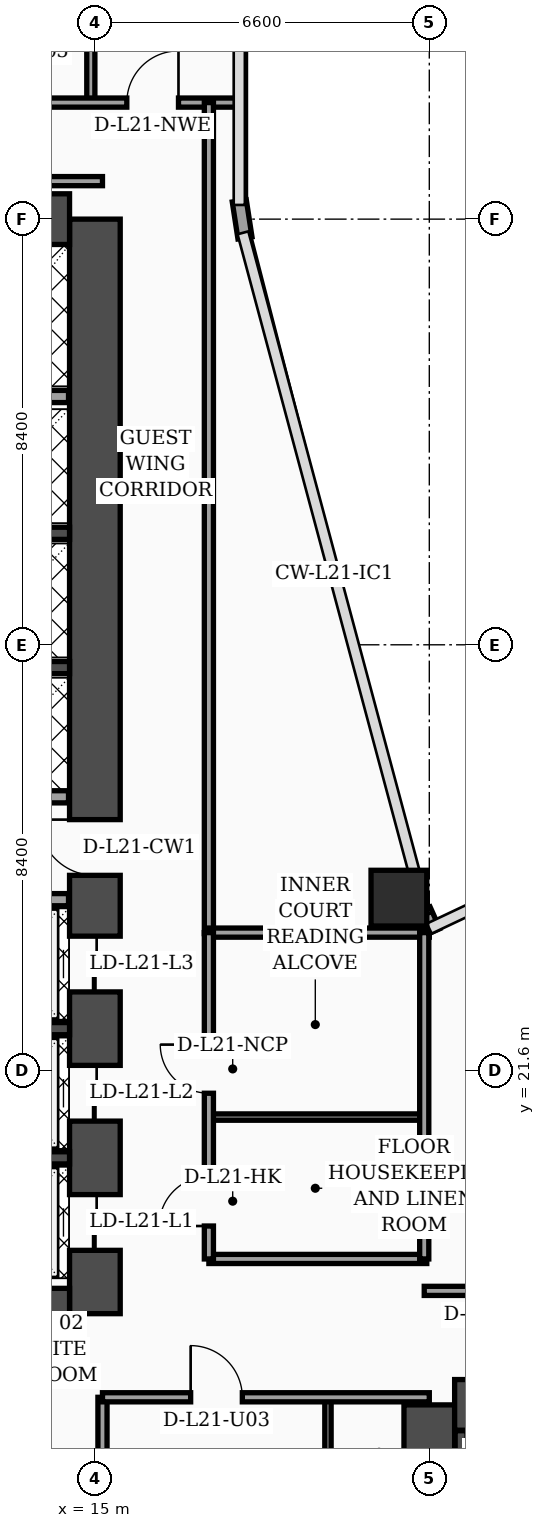
"""IFC4 building model, lengths in metres.
Left out: names, types, materials, properties, quantities, classifications, styles, units other than length and angle.
Written with IfcOpenShell. Run it as: python <this file> out.ifc"""

import sys

from ifc_helpers import new_model, si_unit, direction, frame, frame_2d, origin, origin_2d, place, context, subcontext, project, spatial, rectangle, hollow_rectangle, extrude, element, fill, save


model = new_model("IFC4")
c1 = context("Model", 3, precision=1e-05, world=origin(), true_north=direction((0.0, 1.0)))
c2 = subcontext(c1, "Body", "Model", "MODEL_VIEW")
j1 = project(units=[si_unit("LENGTHUNIT", "METRE"), si_unit("PLANEANGLEUNIT", "RADIAN")], contexts=[c1])
p1 = place(None, origin())
s1 = spatial("IfcSite", under=j1, at=p1, CompositionType="ELEMENT")
p2 = place(p1, origin())
s2 = spatial("IfcBuilding", under=s1, at=p2, CompositionType="ELEMENT")
p3 = place(p2, frame((0.0, 0.0, 88.8)))
s3 = spatial("IfcBuildingStorey", under=s2, at=p3, CompositionType="ELEMENT", Elevation=88.8)
p4 = place(p3, frame((15.0, 16.8, 0.0), z_axis=(0.0, 0.0, 1.0), x_axis=(0.0, 1.0, 0.0)))
e1 = element("IfcWall", 1, at=p4, inside=s3, PredefinedType="SHEAR", context=c2, shape_type="SweptSolid", body=[
    extrude(rectangle(XDim=21.6, YDim=1.0, at=frame_2d((10.8, 0.0))), origin(), (0.0, 0.0, 1.0), 3.52),
])
p5 = place(p4, frame((8.65, 0.0, 0.0)))
e2 = element("IfcOpeningElement", 2, at=p5, cuts=e1, PredefinedType="OPENING", context=c2, shape_type="SweptSolid", body=[
    extrude(rectangle(XDim=1.1, YDim=2.2, at=frame_2d((0.55, 1.1))), frame((0.0, 0.51, 0.0), z_axis=(0.0, -1.0, 0.0), x_axis=(1.0, 0.0, 0.0)), (0.0, 0.0, 1.0), 1.02),
])
p6 = place(p4, frame((1.25, 0.0, 0.0)))
e3 = element("IfcOpeningElement", 3, at=p6, cuts=e1, PredefinedType="OPENING", context=c2, shape_type="SweptSolid", body=[
    extrude(rectangle(XDim=1.1, YDim=2.2, at=frame_2d((0.55, 1.1))), frame((0.0, 0.51, 0.0), z_axis=(0.0, -1.0, 0.0), x_axis=(1.0, 0.0, 0.0)), (0.0, 0.0, 1.0), 1.02),
])
p7 = place(p4, frame((3.8, 0.0, 0.0)))
e4 = element("IfcOpeningElement", 4, at=p7, cuts=e1, PredefinedType="OPENING", context=c2, shape_type="SweptSolid", body=[
    extrude(rectangle(XDim=1.1, YDim=2.2, at=frame_2d((0.55, 1.1))), frame((0.0, 0.51, 0.0), z_axis=(0.0, -1.0, 0.0), x_axis=(1.0, 0.0, 0.0)), (0.0, 0.0, 1.0), 1.02),
])
p8 = place(p4, frame((6.35, 0.0, 0.0)))
e5 = element("IfcOpeningElement", 5, at=p8, cuts=e1, PredefinedType="OPENING", context=c2, shape_type="SweptSolid", body=[
    extrude(rectangle(XDim=1.1, YDim=2.2, at=frame_2d((0.55, 1.1))), frame((0.0, 0.51, 0.0), z_axis=(0.0, -1.0, 0.0), x_axis=(1.0, 0.0, 0.0)), (0.0, 0.0, 1.0), 1.02),
])
for number, where, z_axis, x_axis in (
    (6, (4.7, 38.4, 0.0), (0.0, 0.0, 1.0), (1.0, 0.0, 0.0)),
    (7, (4.7, 16.8, 0.0), (0.0, 0.0, 1.0), (1.0, 0.0, 0.0)),
):
    element("IfcWall", number, at=place(p3, frame(where, z_axis=z_axis, x_axis=x_axis)), inside=s3, PredefinedType="SHEAR", context=c2, shape_type="SweptSolid", body=[
        extrude(rectangle(XDim=9.8, YDim=1.0, at=frame_2d((4.9, 0.0))), origin(), (0.0, 0.0, 1.0), 3.52),
    ])
p9 = place(p3, frame((21.6, 4.6, 0.0), z_axis=(0.0, 0.0, 1.0), x_axis=(0.0, 1.0, 0.0)))
e8 = element("IfcWall", 8, at=p9, inside=s3, PredefinedType="SHEAR", context=c2, shape_type="SweptSolid", body=[
    extrude(rectangle(XDim=10.4, YDim=1.0, at=frame_2d((5.2, 0.0))), origin(), (0.0, 0.0, 1.0), 3.52),
])
p10 = place(p3, frame((22.1, 15.0, 0.0), z_axis=(0.0, 0.0, 1.0), x_axis=(1.0, 0.0, 0.0)))
e9 = element("IfcWall", 9, at=p10, inside=s3, PredefinedType="SHEAR", context=c2, shape_type="SweptSolid", body=[
    extrude(rectangle(XDim=9.8, YDim=1.0, at=frame_2d((4.9, 0.0))), origin(), (0.0, 0.0, 1.0), 3.52),
])
p11 = place(p10, frame((4.8, 0.0, 0.0)))
e10 = element("IfcOpeningElement", 10, at=p11, cuts=e9, PredefinedType="OPENING", context=c2, shape_type="SweptSolid", body=[
    extrude(rectangle(XDim=1.1, YDim=2.2, at=frame_2d((0.55, 1.1))), frame((0.0, 0.51, 0.0), z_axis=(0.0, -1.0, 0.0), x_axis=(1.0, 0.0, 0.0)), (0.0, 0.0, 1.0), 1.02),
])
p12 = place(p3, frame((22.23, 5.1, 0.0), z_axis=(0.0, 0.0, 1.0), x_axis=(0.0, 1.0, 0.0)))
e11 = element("IfcWall", 11, at=p12, inside=s3, PredefinedType="SOLIDWALL", context=c2, shape_type="SweptSolid", body=[
    extrude(rectangle(XDim=9.39, YDim=0.24, at=frame_2d((4.695, 0.0))), origin(), (0.0, 0.0, 1.0), 3.52),
])
for number, where, z_axis, x_axis in (
    (12, (12.18, 19.875, 0.0), (0.0, 0.0, 1.0), (1.0, 0.0, 0.0)),
    (13, (12.18, 22.425, 0.0), (0.0, 0.0, 1.0), (1.0, 0.0, 0.0)),
    (14, (12.18, 29.55, 0.0), (0.0, 0.0, 1.0), (1.0, 0.0, 0.0)),
    (15, (12.18, 32.2, 0.0), (0.0, 0.0, 1.0), (1.0, 0.0, 0.0)),
):
    element("IfcWall", number, at=place(p3, frame(where, z_axis=z_axis, x_axis=x_axis)), inside=s3, PredefinedType="SOLIDWALL", context=c2, shape_type="SweptSolid", body=[
        extrude(rectangle(XDim=2.32, YDim=0.24, at=frame_2d((1.16, 0.0))), origin(), (0.0, 0.0, 1.0), 3.52),
    ])
p13 = place(p3, frame((21.0, 25.0, 0.0), z_axis=(0.0, 0.0, 1.0), x_axis=(1.0, 0.0, 0.0)))
e16 = element("IfcColumn", 16, at=p13, inside=s3, PredefinedType="COLUMN", context=c2, shape_type="SweptSolid", body=[
    extrude(hollow_rectangle(XDim=1.1, YDim=1.1, WallThickness=0.045, at=origin_2d()), origin(), (0.0, 0.0, 1.0), 3.52),
])
p14 = place(p3, frame((21.68, 24.34, 0.0), z_axis=(0.0, 0.0, 1.0), x_axis=(-0.40758134973, 0.913168901875, 0.0)))
e17 = element("IfcWall", 17, at=p14, inside=s3, PredefinedType="SOLIDWALL", context=c2, shape_type="SweptSolid", body=[
    extrude(rectangle(XDim=0.471, YDim=0.28, at=frame_2d((0.235, 0.0))), origin(), (0.0, 0.0, 1.0), 3.52),
])
p15 = place(p3, frame((17.962, 38.03, 0.0), z_axis=(0.0, 0.0, 1.0), x_axis=(-0.15141125477, 0.988470855377, 0.0)))
e18 = element("IfcWall", 18, at=p15, inside=s3, PredefinedType="SOLIDWALL", context=c2, shape_type="SweptSolid", body=[
    extrude(rectangle(XDim=0.739, YDim=0.28, at=frame_2d((0.369, 0.0))), origin(), (0.0, 0.0, 1.0), 3.52),
])
p16 = place(p3, frame((12.15, 24.97, 0.0), z_axis=(0.0, 0.0, 1.0), x_axis=(1.0, 0.0, 0.0)))
e19 = element("IfcWall", 19, at=p16, inside=s3, PredefinedType="SOLIDWALL", context=c2, shape_type="SweptSolid", body=[
    extrude(rectangle(XDim=2.33, YDim=0.24, at=frame_2d((1.165, 0.0))), origin(), (0.0, 0.0, 1.0), 2.82),
])
p17 = place(p3, frame((12.25, 27.0, 0.0), z_axis=(0.0, 0.0, 1.0), x_axis=(1.0, 0.0, 0.0)))
e20 = element("IfcWall", 20, at=p17, inside=s3, PredefinedType="SOLIDWALL", context=c2, shape_type="SweptSolid", body=[
    extrude(rectangle(XDim=2.23, YDim=0.24, at=frame_2d((1.115, 0.0))), origin(), (0.0, 0.0, 1.0), 3.52),
])
p18 = place(p3, frame((9.66, 34.9, 0.0), z_axis=(0.0, 0.0, 1.0), x_axis=(1.0, 0.0, 0.0)))
e21 = element("IfcWall", 21, at=p18, inside=s3, PredefinedType="SOLIDWALL", context=c2, shape_type="SweptSolid", body=[
    extrude(rectangle(XDim=4.82, YDim=0.24, at=frame_2d((2.41, 0.0))), origin(), (0.0, 0.0, 1.0), 3.52),
])
p19 = place(p3, frame((15.15, 2.44, 0.0), z_axis=(0.0, 0.0, 1.0), x_axis=(0.0, 1.0, 0.0)))
e22 = element("IfcWall", 22, at=p19, inside=s3, PredefinedType="PARTITIONING", context=c2, shape_type="SweptSolid", body=[
    extrude(rectangle(XDim=12.71, YDim=0.18, at=frame_2d((6.355, 0.0))), origin(), (0.0, 0.0, 1.0), 3.02),
])
p20 = place(p3, frame((19.6, 2.44, 0.0), z_axis=(0.0, 0.0, 1.0), x_axis=(0.0, 1.0, 0.0)))
e23 = element("IfcWall", 23, at=p20, inside=s3, PredefinedType="PARTITIONING", context=c2, shape_type="SweptSolid", body=[
    extrude(rectangle(XDim=12.71, YDim=0.125, at=frame_2d((6.355, 0.0))), origin(), (0.0, 0.0, 1.0), 2.32),
])
p21 = place(p20, frame((4.34, 0.0, 0.0)))
e24 = element("IfcOpeningElement", 24, at=p21, cuts=e23, PredefinedType="OPENING", context=c2, shape_type="SweptSolid", body=[
    extrude(rectangle(XDim=0.96, YDim=2.2, at=frame_2d((0.48, 1.1))), frame((0.0, 0.073, 0.0), z_axis=(0.0, -1.0, 0.0), x_axis=(1.0, 0.0, 0.0)), (0.0, 0.0, 1.0), 0.145),
])
p22 = place(p20, frame((10.18, 0.0, 0.0)))
e25 = element("IfcOpeningElement", 25, at=p22, cuts=e23, PredefinedType="OPENING", context=c2, shape_type="SweptSolid", body=[
    extrude(rectangle(XDim=0.9, YDim=2.15, at=frame_2d((0.45, 1.075))), frame((0.0, 0.073, 0.0), z_axis=(0.0, -1.0, 0.0), x_axis=(1.0, 0.0, 0.0)), (0.0, 0.0, 1.0), 0.145),
])
p23 = place(p3, frame((15.15, 15.15, 0.0), z_axis=(0.0, 0.0, 1.0), x_axis=(1.0, 0.0, 0.0)))
e26 = element("IfcWall", 26, at=p23, inside=s3, PredefinedType="PARTITIONING", context=c2, shape_type="SweptSolid", body=[
    extrude(rectangle(XDim=6.45, YDim=0.18, at=frame_2d((3.225, 0.0))), origin(), (0.0, 0.0, 1.0), 2.32),
])
p24 = place(p23, frame((1.74, 0.0, 0.0)))
e27 = element("IfcOpeningElement", 27, at=p24, cuts=e26, PredefinedType="OPENING", context=c2, shape_type="SweptSolid", body=[
    extrude(rectangle(XDim=1.02, YDim=2.2, at=frame_2d((0.51, 1.1))), frame((0.0, 0.1, 0.0), z_axis=(0.0, -1.0, 0.0), x_axis=(1.0, 0.0, 0.0)), (0.0, 0.0, 1.0), 0.2),
])
p25 = place(p3, frame((14.92, 40.7, 0.0), z_axis=(0.0, 0.0, 1.0), x_axis=(0.0, 1.0, 0.0)))
e28 = element("IfcWall", 28, at=p25, inside=s3, PredefinedType="PARTITIONING", context=c2, shape_type="SweptSolid", body=[
    extrude(rectangle(XDim=7.1, YDim=0.16, at=frame_2d((3.55, 0.0))), origin(), (0.0, 0.0, 1.0), 3.02),
])
p26 = place(p3, frame((0.08, 40.7, 0.0), z_axis=(0.0, 0.0, 1.0), x_axis=(1.0, 0.0, 0.0)))
e29 = element("IfcWall", 29, at=p26, inside=s3, PredefinedType="PARTITIONING", context=c2, shape_type="SweptSolid", body=[
    extrude(rectangle(XDim=17.77, YDim=0.18, at=frame_2d((8.885, 0.0))), origin(), (0.0, 0.0, 1.0), 2.82),
])
p27 = place(p26, frame((0.9, 0.0, 0.0)))
e30 = element("IfcOpeningElement", 30, at=p27, cuts=e29, PredefinedType="OPENING", context=c2, shape_type="SweptSolid", body=[
    extrude(rectangle(XDim=1.02, YDim=2.2, at=frame_2d((0.51, 1.1))), frame((0.0, 0.1, 0.0), z_axis=(0.0, -1.0, 0.0), x_axis=(1.0, 0.0, 0.0)), (0.0, 0.0, 1.0), 0.2),
])
p28 = place(p26, frame((4.2, 0.0, 0.0)))
e31 = element("IfcOpeningElement", 31, at=p28, cuts=e29, PredefinedType="OPENING", context=c2, shape_type="SweptSolid", body=[
    extrude(rectangle(XDim=1.02, YDim=2.2, at=frame_2d((0.51, 1.1))), frame((0.0, 0.1, 0.0), z_axis=(0.0, -1.0, 0.0), x_axis=(1.0, 0.0, 0.0)), (0.0, 0.0, 1.0), 0.2),
])
p29 = place(p26, frame((10.08, 0.0, 0.0)))
e32 = element("IfcOpeningElement", 32, at=p29, cuts=e29, PredefinedType="OPENING", context=c2, shape_type="SweptSolid", body=[
    extrude(rectangle(XDim=1.02, YDim=2.2, at=frame_2d((0.51, 1.1))), frame((0.0, 0.1, 0.0), z_axis=(0.0, -1.0, 0.0), x_axis=(1.0, 0.0, 0.0)), (0.0, 0.0, 1.0), 0.2),
])
p30 = place(p26, frame((15.55, 0.0, 0.0)))
e33 = element("IfcOpeningElement", 33, at=p30, cuts=e29, PredefinedType="OPENING", context=c2, shape_type="SweptSolid", body=[
    extrude(rectangle(XDim=1.02, YDim=2.2, at=frame_2d((0.51, 1.1))), frame((0.0, 0.1, 0.0), z_axis=(0.0, -1.0, 0.0), x_axis=(1.0, 0.0, 0.0)), (0.0, 0.0, 1.0), 0.2),
])
p31 = place(p3, frame((17.25, 24.3, 0.0), z_axis=(0.0, 0.0, 1.0), x_axis=(0.0, 1.0, 0.0)))
e34 = element("IfcWall", 34, at=p31, inside=s3, PredefinedType="PARTITIONING", context=c2, shape_type="SweptSolid", body=[
    extrude(rectangle(XDim=16.4, YDim=0.18, at=frame_2d((8.2, 0.0))), origin(), (0.0, 0.0, 1.0), 2.82),
])
p32 = place(p3, frame((3.68, 39.15, 0.0), z_axis=(0.0, 0.0, 1.0), x_axis=(1.0, 0.0, 0.0)))
e35 = element("IfcWall", 35, at=p32, inside=s3, PredefinedType="PARTITIONING", context=c2, shape_type="SweptSolid", body=[
    extrude(rectangle(XDim=11.47, YDim=0.18, at=frame_2d((5.735, 0.0))), origin(), (0.0, 0.0, 1.0), 2.82),
])
p33 = place(p3, frame((17.25, 17.88, 0.0), z_axis=(0.0, 0.0, 1.0), x_axis=(1.0, 0.0, 0.0)))
e36 = element("IfcWall", 36, at=p33, inside=s3, PredefinedType="PARTITIONING", context=c2, shape_type="SweptSolid", body=[
    extrude(rectangle(XDim=4.3, YDim=0.18, at=frame_2d((2.15, 0.0))), origin(), (0.0, 0.0, 1.0), 3.52),
])
p34 = place(p3, frame((17.25, 20.68, 0.0), z_axis=(0.0, 0.0, 1.0), x_axis=(1.0, 0.0, 0.0)))
e37 = element("IfcWall", 37, at=p34, inside=s3, PredefinedType="PARTITIONING", context=c2, shape_type="SweptSolid", body=[
    extrude(rectangle(XDim=4.3, YDim=0.125, at=frame_2d((2.15, 0.0))), origin(), (0.0, 0.0, 1.0), 3.52),
])
p35 = place(p3, frame((17.25, 24.32, 0.0), z_axis=(0.0, 0.0, 1.0), x_axis=(1.0, 0.0, 0.0)))
e38 = element("IfcWall", 38, at=p35, inside=s3, PredefinedType="PARTITIONING", context=c2, shape_type="SweptSolid", body=[
    extrude(rectangle(XDim=4.35, YDim=0.18, at=frame_2d((2.175, 0.0))), origin(), (0.0, 0.0, 1.0), 3.52),
])
p36 = place(p3, frame((21.5, 17.88, 0.0), z_axis=(0.0, 0.0, 1.0), x_axis=(0.0, 1.0, 0.0)))
e39 = element("IfcWall", 39, at=p36, inside=s3, PredefinedType="PARTITIONING", context=c2, shape_type="SweptSolid", body=[
    extrude(rectangle(XDim=6.44, YDim=0.18, at=frame_2d((3.22, 0.0))), origin(), (0.0, 0.0, 1.0), 3.52),
])
p37 = place(p3, frame((17.25, 17.88, 0.0), z_axis=(0.0, 0.0, 1.0), x_axis=(0.0, 1.0, 0.0)))
e40 = element("IfcWall", 40, at=p37, inside=s3, PredefinedType="PARTITIONING", context=c2, shape_type="SweptSolid", body=[
    extrude(rectangle(XDim=6.44, YDim=0.18, at=frame_2d((3.22, 0.0))), origin(), (0.0, 0.0, 1.0), 3.52),
])
p38 = place(p37, frame((0.65, 0.0, 0.0)))
e41 = element("IfcOpeningElement", 41, at=p38, cuts=e40, PredefinedType="OPENING", context=c2, shape_type="SweptSolid", body=[
    extrude(rectangle(XDim=0.98, YDim=2.15, at=frame_2d((0.49, 1.075))), frame((0.0, 0.1, 0.0), z_axis=(0.0, -1.0, 0.0), x_axis=(1.0, 0.0, 0.0)), (0.0, 0.0, 1.0), 0.2),
])
p39 = place(p37, frame((3.27, 0.0, 0.0)))
e42 = element("IfcOpeningElement", 42, at=p39, cuts=e40, PredefinedType="OPENING", context=c2, shape_type="SweptSolid", body=[
    extrude(rectangle(XDim=0.96, YDim=2.2, at=frame_2d((0.48, 1.1))), frame((0.0, 0.1, 0.0), z_axis=(0.0, -1.0, 0.0), x_axis=(1.0, 0.0, 0.0)), (0.0, 0.0, 1.0), 0.2),
])
p40 = place(p3, frame((21.5, 17.25, 0.0), z_axis=(0.0, 0.0, 1.0), x_axis=(1.0, 0.0, 0.0)))
e43 = element("IfcWall", 43, at=p40, inside=s3, PredefinedType="PARTITIONING", context=c2, shape_type="SweptSolid", body=[
    extrude(rectangle(XDim=21.6, YDim=0.18, at=frame_2d((10.8, 0.0))), origin(), (0.0, 0.0, 1.0), 2.82),
])
p41 = place(p40, frame((0.95, 0.0, 0.0)))
e44 = element("IfcOpeningElement", 44, at=p41, cuts=e43, PredefinedType="OPENING", context=c2, shape_type="SweptSolid", body=[
    extrude(rectangle(XDim=1.02, YDim=2.2, at=frame_2d((0.51, 1.1))), frame((0.0, 0.1, 0.0), z_axis=(0.0, -1.0, 0.0), x_axis=(1.0, 0.0, 0.0)), (0.0, 0.0, 1.0), 0.2),
])
p42 = place(p40, frame((11.7, 0.0, 0.0)))
e45 = element("IfcOpeningElement", 45, at=p42, cuts=e43, PredefinedType="OPENING", context=c2, shape_type="SweptSolid", body=[
    extrude(rectangle(XDim=1.02, YDim=2.2, at=frame_2d((0.51, 1.1))), frame((0.0, 0.1, 0.0), z_axis=(0.0, -1.0, 0.0), x_axis=(1.0, 0.0, 0.0)), (0.0, 0.0, 1.0), 0.2),
])
p43 = place(p24, origin())
e46 = element("IfcDoor", 46, at=p43, inside=s3, OperationType="SINGLE_SWING_LEFT", PredefinedType="DOOR", context=c2, shape_type="SweptSolid", body=[
    extrude(rectangle(XDim=1.02, YDim=2.2, at=frame_2d((0.51, 1.1))), frame((0.0, 0.025, 0.0), z_axis=(0.0, -1.0, 0.0), x_axis=(1.0, 0.0, 0.0)), (0.0, 0.0, 1.0), 0.05),
])
fill(e27, e46)
p44 = place(p30, origin())
e47 = element("IfcDoor", 47, at=p44, inside=s3, OperationType="SINGLE_SWING_RIGHT", PredefinedType="DOOR", context=c2, shape_type="SweptSolid", body=[
    extrude(rectangle(XDim=1.02, YDim=2.2, at=frame_2d((0.51, 1.1))), frame((0.0, 0.025, 0.0), z_axis=(0.0, -1.0, 0.0), x_axis=(1.0, 0.0, 0.0)), (0.0, 0.0, 1.0), 0.05),
])
fill(e33, e47)
p45 = place(p38, origin())
e48 = element("IfcDoor", 48, at=p45, inside=s3, OperationType="SINGLE_SWING_LEFT", PredefinedType="DOOR", context=c2, shape_type="SweptSolid", body=[
    extrude(rectangle(XDim=0.98, YDim=2.15, at=frame_2d((0.49, 1.075))), frame((0.0, 0.025, 0.0), z_axis=(0.0, -1.0, 0.0), x_axis=(1.0, 0.0, 0.0)), (0.0, 0.0, 1.0), 0.05),
])
fill(e41, e48)
p46 = place(p39, origin())
e49 = element("IfcDoor", 49, at=p46, inside=s3, OperationType="SINGLE_SWING_RIGHT", PredefinedType="DOOR", context=c2, shape_type="SweptSolid", body=[
    extrude(rectangle(XDim=0.96, YDim=2.2, at=frame_2d((0.48, 1.1))), frame((0.0, 0.025, 0.0), z_axis=(0.0, -1.0, 0.0), x_axis=(1.0, 0.0, 0.0)), (0.0, 0.0, 1.0), 0.05),
])
fill(e42, e49)
p47 = place(p5, origin())
e50 = element("IfcDoor", 50, at=p47, inside=s3, OperationType="SINGLE_SWING_RIGHT", PredefinedType="DOOR", context=c2, shape_type="SweptSolid", body=[
    extrude(rectangle(XDim=1.1, YDim=2.2, at=frame_2d((0.55, 1.1))), frame((0.0, 0.025, 0.0), z_axis=(0.0, -1.0, 0.0), x_axis=(1.0, 0.0, 0.0)), (0.0, 0.0, 1.0), 0.05),
])
fill(e2, e50)
p48 = place(p6, origin())
e51 = element("IfcDoor", 51, at=p48, inside=s3, OperationType="DOUBLE_DOOR_SLIDING", PredefinedType="DOOR", context=c2, shape_type="SweptSolid", body=[
    extrude(rectangle(XDim=1.1, YDim=2.2, at=frame_2d((0.55, 1.1))), frame((0.0, 0.025, 0.0), z_axis=(0.0, -1.0, 0.0), x_axis=(1.0, 0.0, 0.0)), (0.0, 0.0, 1.0), 0.05),
])
fill(e3, e51)
p49 = place(p7, origin())
e52 = element("IfcDoor", 52, at=p49, inside=s3, OperationType="DOUBLE_DOOR_SLIDING", PredefinedType="DOOR", context=c2, shape_type="SweptSolid", body=[
    extrude(rectangle(XDim=1.1, YDim=2.2, at=frame_2d((0.55, 1.1))), frame((0.0, 0.025, 0.0), z_axis=(0.0, -1.0, 0.0), x_axis=(1.0, 0.0, 0.0)), (0.0, 0.0, 1.0), 0.05),
])
fill(e4, e52)
p50 = place(p8, origin())
e53 = element("IfcDoor", 53, at=p50, inside=s3, OperationType="DOUBLE_DOOR_SLIDING", PredefinedType="DOOR", context=c2, shape_type="SweptSolid", body=[
    extrude(rectangle(XDim=1.1, YDim=2.2, at=frame_2d((0.55, 1.1))), frame((0.0, 0.025, 0.0), z_axis=(0.0, -1.0, 0.0), x_axis=(1.0, 0.0, 0.0)), (0.0, 0.0, 1.0), 0.05),
])
fill(e5, e53)
save(model, sys.argv[1])
